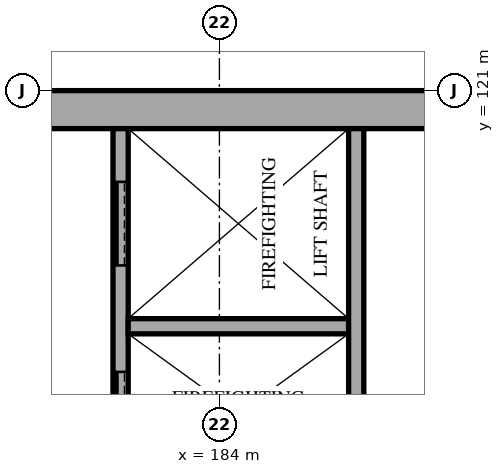
"""IFC4 building model, lengths in metres.
Left out: names, types, materials, properties, quantities, classifications, styles, units other than length and angle.
Written with IfcOpenShell. Run it as: python <this file> out.ifc"""

import sys

from ifc_helpers import new_model, si_unit, direction, frame, frame_2d, origin, place, context, subcontext, project, spatial, rectangle, extrude, element, fill, save


model = new_model("IFC4")
c1 = context("Model", 3, precision=1e-05, world=origin(), true_north=direction((0.0, 1.0)))
c2 = subcontext(c1, "Body", "Model", "MODEL_VIEW")
j1 = project(units=[si_unit("LENGTHUNIT", "METRE"), si_unit("PLANEANGLEUNIT", "RADIAN")], contexts=[c1])
p1 = place(None, origin())
s1 = spatial("IfcSite", under=j1, at=p1, CompositionType="ELEMENT")
p2 = place(p1, origin())
s2 = spatial("IfcBuilding", under=s1, at=p2, CompositionType="ELEMENT")
p3 = place(p2, frame((0.0, 0.0, 15.0)))
s3 = spatial("IfcBuildingStorey", under=s2, at=p3, CompositionType="ELEMENT", Elevation=15.0)
p4 = place(p3, frame((172.0, 120.75, 0.0), z_axis=(0.0, 0.0, 1.0), x_axis=(1.0, 0.0, 0.0)))
e1 = element("IfcWall", 1, at=p4, inside=s3, PredefinedType="SHEAR", context=c2, shape_type="SweptSolid", body=[
    extrude(rectangle(XDim=18.0, YDim=0.5, at=frame_2d((9.0, 0.0))), origin(), (0.0, 0.0, 1.0), 4.2),
])
p5 = place(p4, frame((8.3, 0.0, 0.0)))
e2 = element("IfcOpeningElement", 2, at=p5, cuts=e1, PredefinedType="OPENING", context=c2, shape_type="SweptSolid", body=[
    extrude(rectangle(XDim=1.2, YDim=2.1, at=frame_2d((0.6, 1.05))), frame((0.0, 0.26, 0.0), z_axis=(0.0, -1.0, 0.0), x_axis=(1.0, 0.0, 0.0)), (0.0, 0.0, 1.0), 0.52),
])
p6 = place(p4, frame((15.2, 0.0, 0.0)))
e3 = element("IfcOpeningElement", 3, at=p6, cuts=e1, PredefinedType="OPENING", context=c2, shape_type="SweptSolid", body=[
    extrude(rectangle(XDim=1.0, YDim=2.1, at=frame_2d((0.5, 1.05))), frame((0.0, 0.26, 0.0), z_axis=(0.0, -1.0, 0.0), x_axis=(1.0, 0.0, 0.0)), (0.0, 0.0, 1.0), 0.52),
])
p7 = place(p3, frame((182.7, 115.7, 0.0), z_axis=(0.0, 0.0, 1.0), x_axis=(0.0, 1.0, 0.0)))
e4 = element("IfcWall", 4, at=p7, inside=s3, PredefinedType="SOLIDWALL", context=c2, shape_type="SweptSolid", body=[
    extrude(rectangle(XDim=4.8, YDim=0.2, at=frame_2d((2.4, 0.0))), origin(), (0.0, 0.0, 1.0), 4.0),
])
p8 = place(p7, frame((0.5, 0.0, 0.0)))
e5 = element("IfcOpeningElement", 5, at=p8, cuts=e4, PredefinedType="OPENING", context=c2, shape_type="SweptSolid", body=[
    extrude(rectangle(XDim=1.1, YDim=2.1, at=frame_2d((0.55, 1.05))), frame((0.0, 0.11, 0.0), z_axis=(0.0, -1.0, 0.0), x_axis=(1.0, 0.0, 0.0)), (0.0, 0.0, 1.0), 0.22),
])
p9 = place(p7, frame((3.0, 0.0, 0.0)))
e6 = element("IfcOpeningElement", 6, at=p9, cuts=e4, PredefinedType="OPENING", context=c2, shape_type="SweptSolid", body=[
    extrude(rectangle(XDim=1.1, YDim=2.1, at=frame_2d((0.55, 1.05))), frame((0.0, 0.11, 0.0), z_axis=(0.0, -1.0, 0.0), x_axis=(1.0, 0.0, 0.0)), (0.0, 0.0, 1.0), 0.22),
])
p10 = place(p3, frame((182.8, 117.9, 0.0), z_axis=(0.0, 0.0, 1.0), x_axis=(1.0, 0.0, 0.0)))
e7 = element("IfcWall", 7, at=p10, inside=s3, PredefinedType="SOLIDWALL", context=c2, shape_type="SweptSolid", body=[
    extrude(rectangle(XDim=2.9, YDim=0.2, at=frame_2d((1.45, 0.0))), origin(), (0.0, 0.0, 1.0), 4.0),
])
p11 = place(p3, frame((185.8, 115.7, 0.0), z_axis=(0.0, 0.0, 1.0), x_axis=(0.0, 1.0, 0.0)))
e8 = element("IfcWall", 8, at=p11, inside=s3, PredefinedType="SOLIDWALL", context=c2, shape_type="SweptSolid", body=[
    extrude(rectangle(XDim=4.8, YDim=0.2, at=frame_2d((2.4, 0.0))), origin(), (0.0, 0.0, 1.0), 4.0),
])
p12 = place(p8, origin())
e9 = element("IfcDoor", 9, at=p12, inside=s3, OperationType="SLIDING_TO_LEFT", PredefinedType="DOOR", context=c2, shape_type="SweptSolid", body=[
    extrude(rectangle(XDim=1.1, YDim=2.1, at=frame_2d((0.55, 1.05))), frame((0.0, 0.025, 0.0), z_axis=(0.0, -1.0, 0.0), x_axis=(1.0, 0.0, 0.0)), (0.0, 0.0, 1.0), 0.05),
])
fill(e5, e9)
p13 = place(p9, origin())
e10 = element("IfcDoor", 10, at=p13, inside=s3, OperationType="SLIDING_TO_LEFT", PredefinedType="DOOR", context=c2, shape_type="SweptSolid", body=[
    extrude(rectangle(XDim=1.1, YDim=2.1, at=frame_2d((0.55, 1.05))), frame((0.0, 0.025, 0.0), z_axis=(0.0, -1.0, 0.0), x_axis=(1.0, 0.0, 0.0)), (0.0, 0.0, 1.0), 0.05),
])
fill(e6, e10)
save(model, sys.argv[1])
